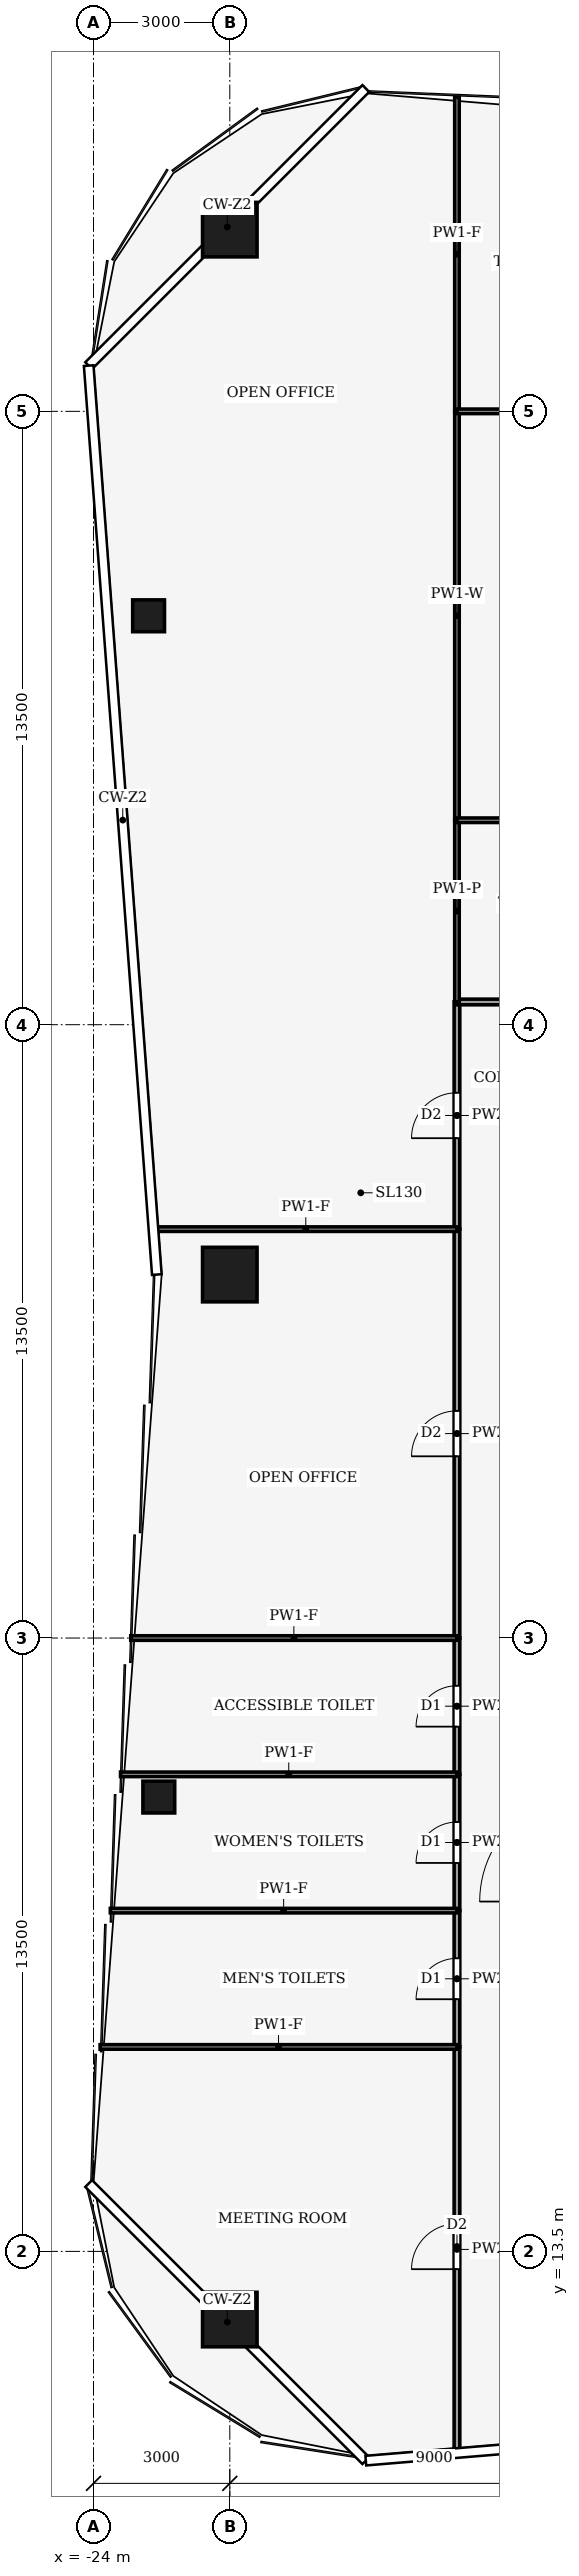
"""IFC4 building model, lengths in metres.
Left out: names, types, materials, properties, quantities, classifications, styles, units other than length and angle.
Written with IfcOpenShell. Run it as: python <this file> out.ifc"""

import sys

from ifc_helpers import new_model, si_unit, direction, frame, frame_2d, origin, origin_2d, place, context, subcontext, project, spatial, rectangle, hollow_rectangle, extrude, element, fill, save


model = new_model("IFC4")
c1 = context("Model", 3, precision=1e-05, world=origin(), true_north=direction((0.0, 1.0)))
c2 = subcontext(c1, "Body", "Model", "MODEL_VIEW")
j1 = project(units=[si_unit("LENGTHUNIT", "METRE"), si_unit("PLANEANGLEUNIT", "RADIAN")], contexts=[c1])
p1 = place(None, origin())
s1 = spatial("IfcSite", under=j1, at=p1, CompositionType="ELEMENT")
p2 = place(p1, origin())
s2 = spatial("IfcBuilding", under=s1, at=p2, CompositionType="ELEMENT")
p3 = place(p2, frame((0.0, 0.0, 134.0)))
s3 = spatial("IfcBuildingStorey", under=s2, at=p3, CompositionType="ELEMENT", Elevation=134.0)
for number, where, z_axis, x_axis in (
    (1, (-21.0, 58.0, 0.0), (0.0, 0.0, 1.0), (1.0, 0.0, 0.0)),
    (2, (-21.0, 12.0, 0.0), (0.0, 0.0, 1.0), (1.0, 0.0, 0.0)),
    (3, (-21.0, 35.0, 0.0), (0.0, 0.0, 1.0), (1.0, 0.0, 0.0)),
):
    element("IfcColumn", number, at=place(p3, frame(where, z_axis=z_axis, x_axis=x_axis)), inside=s3, PredefinedType="COLUMN", context=c2, shape_type="SweptSolid", body=[
        extrude(hollow_rectangle(XDim=1.2, YDim=1.2, WallThickness=0.07, at=origin_2d()), origin(), (0.0, 0.0, 1.0), 4.0),
    ])
for number, where, z_axis, x_axis in (
    (4, (-22.562, 23.5, 0.0), (0.0, 0.0, 1.0), (1.0, 0.0, 0.0)),
    (5, (-22.788, 49.5, 0.0), (0.0, 0.0, 1.0), (1.0, 0.0, 0.0)),
):
    element("IfcColumn", number, at=place(p3, frame(where, z_axis=z_axis, x_axis=x_axis)), inside=s3, PredefinedType="COLUMN", context=c2, shape_type="SweptSolid", body=[
        extrude(hollow_rectangle(XDim=0.7, YDim=0.7, WallThickness=0.03, at=origin_2d()), origin(), (0.0, 0.0, 1.0), 4.0),
    ])
p4 = place(p3, frame((-16.0, 9.087, 0.0), z_axis=(0.0, 0.0, 1.0), x_axis=(0.0, 1.0, 0.0)))
e6 = element("IfcWall", 6, at=p4, inside=s3, PredefinedType="PARTITIONING", context=c2, shape_type="SweptSolid", body=[
    extrude(rectangle(XDim=8.913, YDim=0.125, at=frame_2d((4.457, 0.0))), origin(), (0.0, 0.0, 1.0), 3.04),
])
p5 = place(p4, frame((4.022, 0.0, 0.0)))
e7 = element("IfcOpeningElement", 7, at=p5, cuts=e6, PredefinedType="OPENING", context=c2, shape_type="SweptSolid", body=[
    extrude(rectangle(XDim=1.0, YDim=2.1, at=frame_2d((0.5, 1.05))), frame((0.0, 0.073, 0.0), z_axis=(0.0, -1.0, 0.0), x_axis=(1.0, 0.0, 0.0)), (0.0, 0.0, 1.0), 0.145),
])
p6 = place(p3, frame((-16.0, 18.0, 0.0), z_axis=(0.0, 0.0, 1.0), x_axis=(0.0, 1.0, 0.0)))
e8 = element("IfcWall", 8, at=p6, inside=s3, PredefinedType="PARTITIONING", context=c2, shape_type="SweptSolid", body=[
    extrude(rectangle(XDim=3.0, YDim=0.125, at=frame_2d((1.5, 0.0))), origin(), (0.0, 0.0, 1.0), 3.48),
])
p7 = place(p6, frame((1.05, 0.0, 0.0)))
e9 = element("IfcOpeningElement", 9, at=p7, cuts=e8, PredefinedType="OPENING", context=c2, shape_type="SweptSolid", body=[
    extrude(rectangle(XDim=0.9, YDim=2.1, at=frame_2d((0.45, 1.05))), frame((0.0, 0.073, 0.0), z_axis=(0.0, -1.0, 0.0), x_axis=(1.0, 0.0, 0.0)), (0.0, 0.0, 1.0), 0.145),
])
p8 = place(p3, frame((-16.0, 21.0, 0.0), z_axis=(0.0, 0.0, 1.0), x_axis=(0.0, 1.0, 0.0)))
e10 = element("IfcWall", 10, at=p8, inside=s3, PredefinedType="PARTITIONING", context=c2, shape_type="SweptSolid", body=[
    extrude(rectangle(XDim=3.0, YDim=0.125, at=frame_2d((1.5, 0.0))), origin(), (0.0, 0.0, 1.0), 3.48),
])
p9 = place(p8, frame((1.05, 0.0, 0.0)))
e11 = element("IfcOpeningElement", 11, at=p9, cuts=e10, PredefinedType="OPENING", context=c2, shape_type="SweptSolid", body=[
    extrude(rectangle(XDim=0.9, YDim=2.1, at=frame_2d((0.45, 1.05))), frame((0.0, 0.073, 0.0), z_axis=(0.0, -1.0, 0.0), x_axis=(1.0, 0.0, 0.0)), (0.0, 0.0, 1.0), 0.145),
])
p10 = place(p3, frame((-16.0, 24.0, 0.0), z_axis=(0.0, 0.0, 1.0), x_axis=(0.0, 1.0, 0.0)))
e12 = element("IfcWall", 12, at=p10, inside=s3, PredefinedType="PARTITIONING", context=c2, shape_type="SweptSolid", body=[
    extrude(rectangle(XDim=3.0, YDim=0.125, at=frame_2d((1.5, 0.0))), origin(), (0.0, 0.0, 1.0), 3.87),
])
p11 = place(p10, frame((1.05, 0.0, 0.0)))
e13 = element("IfcOpeningElement", 13, at=p11, cuts=e12, PredefinedType="OPENING", context=c2, shape_type="SweptSolid", body=[
    extrude(rectangle(XDim=0.9, YDim=2.1, at=frame_2d((0.45, 1.05))), frame((0.0, 0.073, 0.0), z_axis=(0.0, -1.0, 0.0), x_axis=(1.0, 0.0, 0.0)), (0.0, 0.0, 1.0), 0.145),
])
p12 = place(p3, frame((-16.0, 27.0, 0.0), z_axis=(0.0, 0.0, 1.0), x_axis=(0.0, 1.0, 0.0)))
e14 = element("IfcWall", 14, at=p12, inside=s3, PredefinedType="PARTITIONING", context=c2, shape_type="SweptSolid", body=[
    extrude(rectangle(XDim=9.0, YDim=0.125, at=frame_2d((4.5, 0.0))), origin(), (0.0, 0.0, 1.0), 3.48),
])
p13 = place(p12, frame((4.0, 0.0, 0.0)))
e15 = element("IfcOpeningElement", 15, at=p13, cuts=e14, PredefinedType="OPENING", context=c2, shape_type="SweptSolid", body=[
    extrude(rectangle(XDim=1.0, YDim=2.1, at=frame_2d((0.5, 1.05))), frame((0.0, 0.073, 0.0), z_axis=(0.0, -1.0, 0.0), x_axis=(1.0, 0.0, 0.0)), (0.0, 0.0, 1.0), 0.145),
])
p14 = place(p3, frame((-16.0, 36.0, 0.0), z_axis=(0.0, 0.0, 1.0), x_axis=(0.0, 1.0, 0.0)))
e16 = element("IfcWall", 16, at=p14, inside=s3, PredefinedType="PARTITIONING", context=c2, shape_type="SweptSolid", body=[
    extrude(rectangle(XDim=5.004, YDim=0.125, at=frame_2d((2.502, 0.0))), origin(), (0.0, 0.0, 1.0), 3.14),
])
p15 = place(p14, frame((2.002, 0.0, 0.0)))
e17 = element("IfcOpeningElement", 17, at=p15, cuts=e16, PredefinedType="OPENING", context=c2, shape_type="SweptSolid", body=[
    extrude(rectangle(XDim=1.0, YDim=2.1, at=frame_2d((0.5, 1.05))), frame((0.0, 0.073, 0.0), z_axis=(0.0, -1.0, 0.0), x_axis=(1.0, 0.0, 0.0)), (0.0, 0.0, 1.0), 0.145),
])
p16 = place(p3, frame((-16.0, 41.0, 0.0), z_axis=(0.0, 0.0, 1.0), x_axis=(1.0, 0.0, 0.0)))
e18 = element("IfcWall", 18, at=p16, inside=s3, PredefinedType="PARTITIONING", context=c2, shape_type="SweptSolid", body=[
    extrude(rectangle(XDim=4.0, YDim=0.125, at=frame_2d((2.0, 0.0))), origin(), (0.0, 0.0, 1.0), 3.44),
])
p17 = place(p16, frame((1.5, 0.0, 0.0)))
e19 = element("IfcOpeningElement", 19, at=p17, cuts=e18, PredefinedType="OPENING", context=c2, shape_type="SweptSolid", body=[
    extrude(rectangle(XDim=1.0, YDim=2.1, at=frame_2d((0.5, 1.05))), frame((0.0, 0.073, 0.0), z_axis=(0.0, -1.0, 0.0), x_axis=(1.0, 0.0, 0.0)), (0.0, 0.0, 1.0), 0.145),
])
p18 = place(p3, frame((-16.0, 18.0, 0.0), z_axis=(0.0, 0.0, 1.0), x_axis=(-1.0, 0.0, 0.0)))
e20 = element("IfcWall", 20, at=p18, inside=s3, PredefinedType="PARTITIONING", context=c2, shape_type="SweptSolid", body=[
    extrude(rectangle(XDim=7.855, YDim=0.1, at=frame_2d((3.927, 0.0))), origin(), (0.0, 0.0, 1.0), 3.04),
])
p19 = place(p3, frame((-16.0, 21.0, 0.0), z_axis=(0.0, 0.0, 1.0), x_axis=(-1.0, 0.0, 0.0)))
e21 = element("IfcWall", 21, at=p19, inside=s3, PredefinedType="PARTITIONING", context=c2, shape_type="SweptSolid", body=[
    extrude(rectangle(XDim=7.63, YDim=0.1, at=frame_2d((3.815, 0.0))), origin(), (0.0, 0.0, 1.0), 3.04),
])
p20 = place(p3, frame((-16.0, 24.0, 0.0), z_axis=(0.0, 0.0, 1.0), x_axis=(-1.0, 0.0, 0.0)))
e22 = element("IfcWall", 22, at=p20, inside=s3, PredefinedType="PARTITIONING", context=c2, shape_type="SweptSolid", body=[
    extrude(rectangle(XDim=7.405, YDim=0.1, at=frame_2d((3.703, 0.0))), origin(), (0.0, 0.0, 1.0), 3.04),
])
p21 = place(p3, frame((-16.0, 27.0, 0.0), z_axis=(0.0, 0.0, 1.0), x_axis=(-1.0, 0.0, 0.0)))
e23 = element("IfcWall", 23, at=p21, inside=s3, PredefinedType="PARTITIONING", context=c2, shape_type="SweptSolid", body=[
    extrude(rectangle(XDim=7.18, YDim=0.1, at=frame_2d((3.59, 0.0))), origin(), (0.0, 0.0, 1.0), 3.04),
])
p22 = place(p3, frame((-16.0, 36.0, 0.0), z_axis=(0.0, 0.0, 1.0), x_axis=(-1.0, 0.0, 0.0)))
e24 = element("IfcWall", 24, at=p22, inside=s3, PredefinedType="PARTITIONING", context=c2, shape_type="SweptSolid", body=[
    extrude(rectangle(XDim=6.655, YDim=0.1, at=frame_2d((3.328, 0.0))), origin(), (0.0, 0.0, 1.0), 3.04),
])
p23 = place(p3, frame((-16.0, 41.0, 0.0), z_axis=(0.0, 0.0, 1.0), x_axis=(0.0, 1.0, 0.0)))
e25 = element("IfcWall", 25, at=p23, inside=s3, PredefinedType="PARTITIONING", context=c2, shape_type="SweptSolid", body=[
    extrude(rectangle(XDim=4.0, YDim=0.1, at=frame_2d((2.0, 0.0))), origin(), (0.0, 0.0, 1.0), 3.44),
])
p24 = place(p3, frame((-16.0, 45.0, 0.0), z_axis=(0.0, 0.0, 1.0), x_axis=(0.0, 1.0, 0.0)))
e26 = element("IfcWall", 26, at=p24, inside=s3, PredefinedType="PARTITIONING", context=c2, shape_type="SweptSolid", body=[
    extrude(rectangle(XDim=9.0, YDim=0.1, at=frame_2d((4.5, 0.0))), origin(), (0.0, 0.0, 1.0), 3.24),
])
p25 = place(p3, frame((-16.0, 54.0, 0.0), z_axis=(0.0, 0.0, 1.0), x_axis=(0.0, 1.0, 0.0)))
e27 = element("IfcWall", 27, at=p25, inside=s3, PredefinedType="PARTITIONING", context=c2, shape_type="SweptSolid", body=[
    extrude(rectangle(XDim=6.913, YDim=0.1, at=frame_2d((3.457, 0.0))), origin(), (0.0, 0.0, 1.0), 3.04),
])
p26 = place(p3, frame((-11.996, 45.0, 0.0), z_axis=(0.0, 0.0, 1.0), x_axis=(-1.0, 0.0, 0.0)))
e28 = element("IfcWall", 28, at=p26, inside=s3, PredefinedType="PARTITIONING", context=c2, shape_type="SweptSolid", body=[
    extrude(rectangle(XDim=4.004, YDim=0.1, at=frame_2d((2.002, 0.0))), origin(), (0.0, 0.0, 1.0), 3.87),
])
p27 = place(p3, frame((-16.0, 54.0, 0.0), z_axis=(0.0, 0.0, 1.0), x_axis=(1.0, 0.0, 0.0)))
e29 = element("IfcWall", 29, at=p27, inside=s3, PredefinedType="PARTITIONING", context=c2, shape_type="SweptSolid", body=[
    extrude(rectangle(XDim=13.0, YDim=0.1, at=frame_2d((6.5, 0.0))), origin(), (0.0, 0.0, 1.0), 3.44),
])
p28 = place(p27, frame((6.0, 0.0, 0.0)))
e30 = element("IfcOpeningElement", 30, at=p28, cuts=e29, PredefinedType="OPENING", context=c2, shape_type="SweptSolid", body=[
    extrude(rectangle(XDim=1.0, YDim=2.1, at=frame_2d((0.5, 1.05))), frame((0.0, 0.06, 0.0), z_axis=(0.0, -1.0, 0.0), x_axis=(1.0, 0.0, 0.0)), (0.0, 0.0, 1.0), 0.12),
])
p29 = place(p5, origin())
e31 = element("IfcDoor", 31, at=p29, inside=s3, OperationType="SINGLE_SWING_RIGHT", PredefinedType="DOOR", context=c2, shape_type="SweptSolid", body=[
    extrude(rectangle(XDim=1.0, YDim=2.1, at=frame_2d((0.5, 1.05))), frame((0.0, 0.025, 0.0), z_axis=(0.0, -1.0, 0.0), x_axis=(1.0, 0.0, 0.0)), (0.0, 0.0, 1.0), 0.05),
])
fill(e7, e31)
p30 = place(p7, origin())
e32 = element("IfcDoor", 32, at=p30, inside=s3, OperationType="SINGLE_SWING_RIGHT", PredefinedType="DOOR", context=c2, shape_type="SweptSolid", body=[
    extrude(rectangle(XDim=0.9, YDim=2.1, at=frame_2d((0.45, 1.05))), frame((0.0, 0.025, 0.0), z_axis=(0.0, -1.0, 0.0), x_axis=(1.0, 0.0, 0.0)), (0.0, 0.0, 1.0), 0.05),
])
fill(e9, e32)
p31 = place(p9, origin())
e33 = element("IfcDoor", 33, at=p31, inside=s3, OperationType="SINGLE_SWING_LEFT", PredefinedType="DOOR", context=c2, shape_type="SweptSolid", body=[
    extrude(rectangle(XDim=0.9, YDim=2.1, at=frame_2d((0.45, 1.05))), frame((0.0, 0.025, 0.0), z_axis=(0.0, -1.0, 0.0), x_axis=(1.0, 0.0, 0.0)), (0.0, 0.0, 1.0), 0.05),
])
fill(e11, e33)
p32 = place(p11, origin())
e34 = element("IfcDoor", 34, at=p32, inside=s3, OperationType="SINGLE_SWING_RIGHT", PredefinedType="DOOR", context=c2, shape_type="SweptSolid", body=[
    extrude(rectangle(XDim=0.9, YDim=2.1, at=frame_2d((0.45, 1.05))), frame((0.0, 0.025, 0.0), z_axis=(0.0, -1.0, 0.0), x_axis=(1.0, 0.0, 0.0)), (0.0, 0.0, 1.0), 0.05),
])
fill(e13, e34)
p33 = place(p13, origin())
e35 = element("IfcDoor", 35, at=p33, inside=s3, OperationType="SINGLE_SWING_LEFT", PredefinedType="DOOR", context=c2, shape_type="SweptSolid", body=[
    extrude(rectangle(XDim=1.0, YDim=2.1, at=frame_2d((0.5, 1.05))), frame((0.0, 0.025, 0.0), z_axis=(0.0, -1.0, 0.0), x_axis=(1.0, 0.0, 0.0)), (0.0, 0.0, 1.0), 0.05),
])
fill(e15, e35)
p34 = place(p15, origin())
e36 = element("IfcDoor", 36, at=p34, inside=s3, OperationType="SINGLE_SWING_RIGHT", PredefinedType="DOOR", context=c2, shape_type="SweptSolid", body=[
    extrude(rectangle(XDim=1.0, YDim=2.1, at=frame_2d((0.5, 1.05))), frame((0.0, 0.025, 0.0), z_axis=(0.0, -1.0, 0.0), x_axis=(1.0, 0.0, 0.0)), (0.0, 0.0, 1.0), 0.05),
])
fill(e17, e36)
save(model, sys.argv[1])
